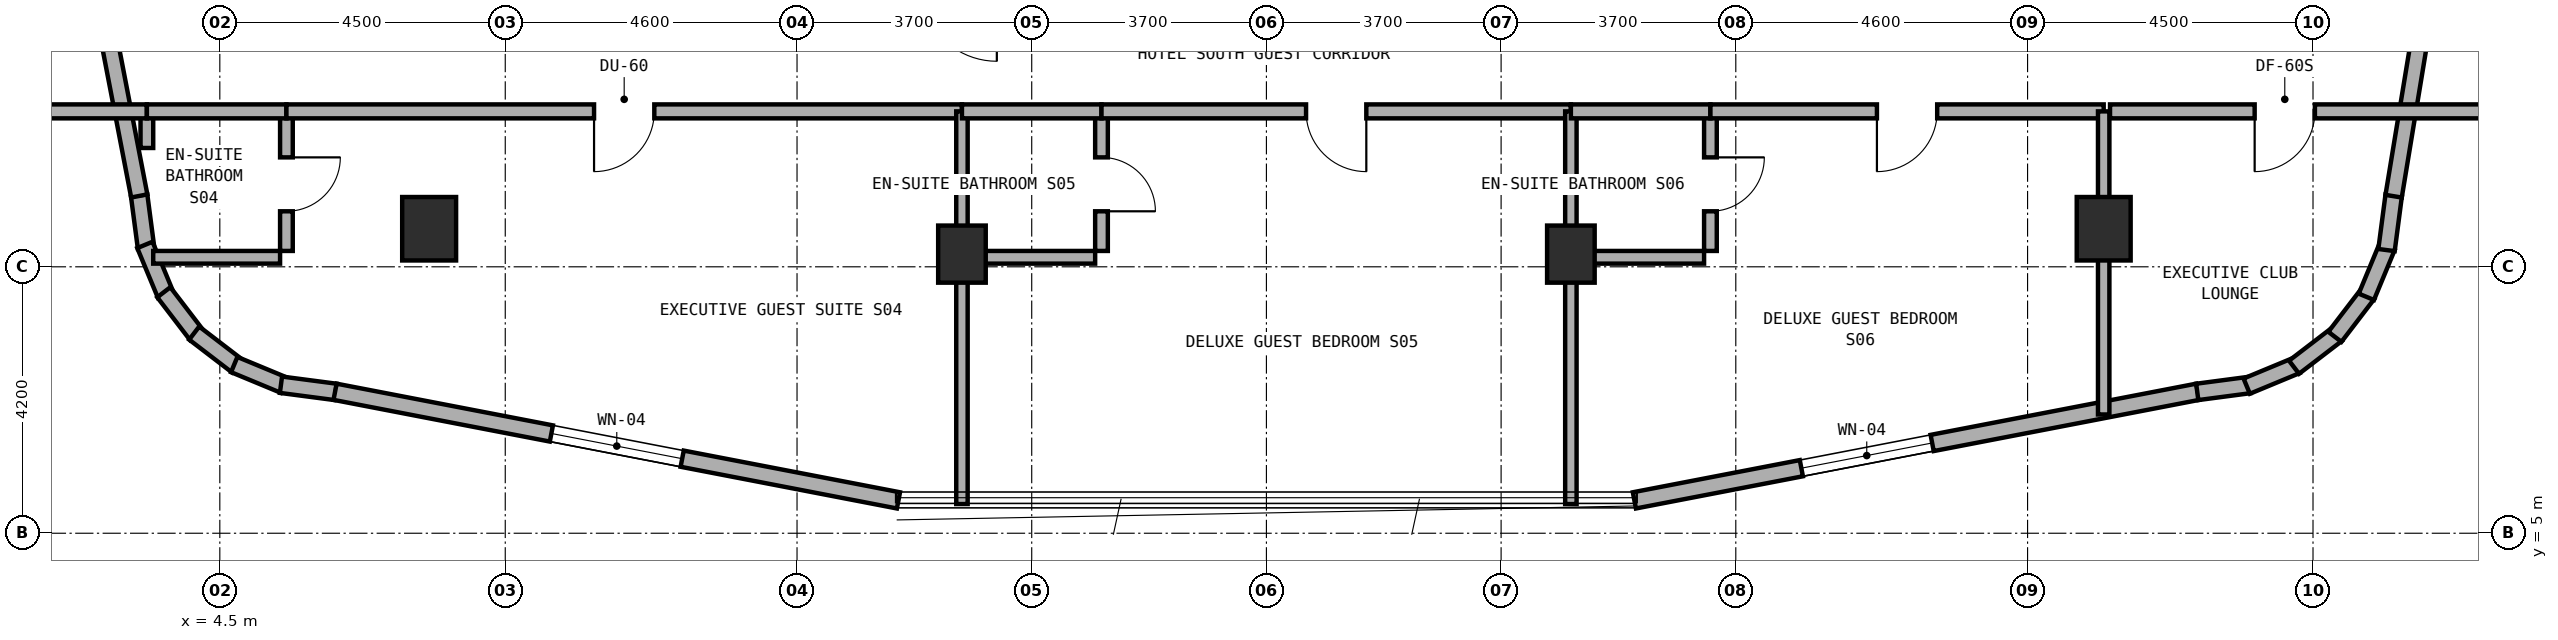
"""IFC4 building model, lengths in metres.
Left out: names, types, materials, properties, quantities, classifications, styles, units other than length and angle.
Written with IfcOpenShell. Run it as: python <this file> out.ifc"""

import sys

from ifc_helpers import new_model, si_unit, direction, frame, frame_2d, origin, origin_2d, place, context, subcontext, project, spatial, rectangle, extrude, element, fill, save


model = new_model("IFC4")
c1 = context("Model", 3, precision=1e-05, world=origin(), true_north=direction((0.0, 1.0)))
c2 = subcontext(c1, "Body", "Model", "MODEL_VIEW")
j1 = project(units=[si_unit("LENGTHUNIT", "METRE"), si_unit("PLANEANGLEUNIT", "RADIAN")], contexts=[c1])
p1 = place(None, origin())
s1 = spatial("IfcSite", under=j1, at=p1, CompositionType="ELEMENT")
p2 = place(p1, origin())
s2 = spatial("IfcBuilding", under=s1, at=p2, CompositionType="ELEMENT")
p3 = place(p2, frame((0.0, 0.0, 181.1)))
s3 = spatial("IfcBuildingStorey", under=s2, at=p3, CompositionType="ELEMENT", Elevation=181.1)
for number, where, z_axis, x_axis in (
    (1, (16.2, 9.4, 0.0), (0.0, 0.0, 1.0), (1.0, 0.0, 0.0)),
    (2, (25.8, 9.4, 0.0), (0.0, 0.0, 1.0), (1.0, 0.0, 0.0)),
):
    element("IfcColumn", number, at=place(p3, frame(where, z_axis=z_axis, x_axis=x_axis)), inside=s3, PredefinedType="COLUMN", context=c2, shape_type="SweptSolid", body=[
        extrude(rectangle(XDim=0.75, YDim=0.9, at=origin_2d()), origin(), (0.0, 0.0, 1.0), 3.6),
    ])
for number, where, z_axis, x_axis in (
    (3, (7.8, 9.8, 0.0), (0.0, 0.0, 1.0), (1.0, 0.0, 0.0)),
    (4, (34.2, 9.8, 0.0), (0.0, 0.0, 1.0), (1.0, 0.0, 0.0)),
):
    element("IfcColumn", number, at=place(p3, frame(where, z_axis=z_axis, x_axis=x_axis)), inside=s3, PredefinedType="COLUMN", context=c2, shape_type="SweptSolid", body=[
        extrude(rectangle(XDim=0.85, YDim=1.0, at=origin_2d()), origin(), (0.0, 0.0, 1.0), 3.6),
    ])
p4 = place(p3, frame((3.228, 10.325, 0.0), z_axis=(0.0, 0.0, 1.0), x_axis=(0.130704676564, -0.99142134712, 0.0)))
e5 = element("IfcWall", 5, at=p4, inside=s3, PredefinedType="STANDARD", context=c2, shape_type="SweptSolid", body=[
    extrude(rectangle(XDim=0.833, YDim=0.26, at=frame_2d((0.417, 0.0))), origin(), (0.0, 0.0, 1.0), 3.32),
])
p5 = place(p3, frame((3.319, 9.545, 0.0), z_axis=(0.0, 0.0, 1.0), x_axis=(0.383086687796, -0.923712395518, 0.0)))
e6 = element("IfcWall", 6, at=p5, inside=s3, PredefinedType="STANDARD", context=c2, shape_type="SweptSolid", body=[
    extrude(rectangle(XDim=0.851, YDim=0.26, at=frame_2d((0.425, 0.0))), origin(), (0.0, 0.0, 1.0), 3.32),
])
for number, where, z_axis, x_axis in (
    (7, (3.617, 8.799, 0.0), (0.0, 0.0, 1.0), (0.608, -0.794, 0.0)),
    (8, (4.096, 8.155, 0.0), (0.0, 0.0, 1.0), (0.794, -0.608, 0.0)),
):
    element("IfcWall", number, at=place(p3, frame(where, z_axis=z_axis, x_axis=x_axis)), inside=s3, PredefinedType="STANDARD", context=c2, shape_type="SweptSolid", body=[
        extrude(rectangle(XDim=0.85, YDim=0.26, at=frame_2d((0.425, 0.0))), origin(), (0.0, 0.0, 1.0), 3.32),
    ])
p6 = place(p3, frame((4.727, 7.659, 0.0), z_axis=(0.0, 0.0, 1.0), x_axis=(0.923712395518, -0.383086687796, 0.0)))
e9 = element("IfcWall", 9, at=p6, inside=s3, PredefinedType="STANDARD", context=c2, shape_type="SweptSolid", body=[
    extrude(rectangle(XDim=0.851, YDim=0.26, at=frame_2d((0.425, 0.0))), origin(), (0.0, 0.0, 1.0), 3.32),
])
p7 = place(p3, frame((5.464, 7.341, 0.0), z_axis=(0.0, 0.0, 1.0), x_axis=(0.991488716273, -0.130192647656, 0.0)))
e10 = element("IfcWall", 10, at=p7, inside=s3, PredefinedType="STANDARD", context=c2, shape_type="SweptSolid", body=[
    extrude(rectangle(XDim=0.868, YDim=0.26, at=frame_2d((0.434, 0.0))), origin(), (0.0, 0.0, 1.0), 3.32),
])
p8 = place(p3, frame((6.317, 7.23, 0.0), z_axis=(0.0, 0.0, 1.0), x_axis=(0.98192801022, -0.189254809039, 0.0)))
e11 = element("IfcWall", 11, at=p8, inside=s3, PredefinedType="STANDARD", context=c2, shape_type="SweptSolid", body=[
    extrude(rectangle(XDim=9.046, YDim=0.26, at=frame_2d((4.523, 0.0))), origin(), (0.0, 0.0, 1.0), 3.32),
])
p9 = place(p8, frame((3.473, 0.0, 0.85)))
e12 = element("IfcOpeningElement", 12, at=p9, cuts=e11, PredefinedType="OPENING", context=c2, shape_type="SweptSolid", body=[
    extrude(rectangle(XDim=2.1, YDim=1.5, at=frame_2d((1.05, 0.75))), frame((0.0, 0.14, 0.0), z_axis=(0.0, -1.0, 0.0), x_axis=(1.0, 0.0, 0.0)), (0.0, 0.0, 1.0), 0.28),
])
p10 = place(p3, frame((26.801, 5.518, 0.0), z_axis=(0.0, 0.0, 1.0), x_axis=(0.98192801022, 0.189254809039, 0.0)))
e13 = element("IfcWall", 13, at=p10, inside=s3, PredefinedType="STANDARD", context=c2, shape_type="SweptSolid", body=[
    extrude(rectangle(XDim=9.046, YDim=0.26, at=frame_2d((4.523, 0.0))), origin(), (0.0, 0.0, 1.0), 3.32),
])
p11 = place(p10, frame((2.681, 0.0, 0.85)))
e14 = element("IfcOpeningElement", 14, at=p11, cuts=e13, PredefinedType="OPENING", context=c2, shape_type="SweptSolid", body=[
    extrude(rectangle(XDim=2.1, YDim=1.5, at=frame_2d((1.05, 0.75))), frame((0.0, 0.14, 0.0), z_axis=(0.0, -1.0, 0.0), x_axis=(1.0, 0.0, 0.0)), (0.0, 0.0, 1.0), 0.28),
])
p12 = place(p3, frame((35.675, 7.228, 0.0), z_axis=(0.0, 0.0, 1.0), x_axis=(0.99142134712, 0.130704676564, 0.0)))
e15 = element("IfcWall", 15, at=p12, inside=s3, PredefinedType="STANDARD", context=c2, shape_type="SweptSolid", body=[
    extrude(rectangle(XDim=0.833, YDim=0.26, at=frame_2d((0.417, 0.0))), origin(), (0.0, 0.0, 1.0), 3.32),
])
p13 = place(p3, frame((36.455, 7.319, 0.0), z_axis=(0.0, 0.0, 1.0), x_axis=(0.923712395518, 0.383086687796, 0.0)))
e16 = element("IfcWall", 16, at=p13, inside=s3, PredefinedType="STANDARD", context=c2, shape_type="SweptSolid", body=[
    extrude(rectangle(XDim=0.851, YDim=0.26, at=frame_2d((0.425, 0.0))), origin(), (0.0, 0.0, 1.0), 3.32),
])
for number, where, z_axis, x_axis in (
    (17, (37.201, 7.617, 0.0), (0.0, 0.0, 1.0), (0.794, 0.608, 0.0)),
    (18, (37.845, 8.096, 0.0), (0.0, 0.0, 1.0), (0.608, 0.794, 0.0)),
):
    element("IfcWall", number, at=place(p3, frame(where, z_axis=z_axis, x_axis=x_axis)), inside=s3, PredefinedType="STANDARD", context=c2, shape_type="SweptSolid", body=[
        extrude(rectangle(XDim=0.85, YDim=0.26, at=frame_2d((0.425, 0.0))), origin(), (0.0, 0.0, 1.0), 3.32),
    ])
p14 = place(p3, frame((38.341, 8.727, 0.0), z_axis=(0.0, 0.0, 1.0), x_axis=(0.383086687796, 0.923712395518, 0.0)))
e19 = element("IfcWall", 19, at=p14, inside=s3, PredefinedType="STANDARD", context=c2, shape_type="SweptSolid", body=[
    extrude(rectangle(XDim=0.851, YDim=0.26, at=frame_2d((0.425, 0.0))), origin(), (0.0, 0.0, 1.0), 3.32),
])
p15 = place(p3, frame((38.659, 9.464, 0.0), z_axis=(0.0, 0.0, 1.0), x_axis=(0.130192647656, 0.991488716273, 0.0)))
e20 = element("IfcWall", 20, at=p15, inside=s3, PredefinedType="STANDARD", context=c2, shape_type="SweptSolid", body=[
    extrude(rectangle(XDim=0.868, YDim=0.26, at=frame_2d((0.434, 0.0))), origin(), (0.0, 0.0, 1.0), 3.32),
])
p16 = place(p3, frame((38.771, 10.313, 0.0), z_axis=(0.0, 0.0, 1.0), x_axis=(0.16277908586, 0.986662540693, 0.0)))
e21 = element("IfcWall", 21, at=p16, inside=s3, PredefinedType="STANDARD", context=c2, shape_type="SweptSolid", body=[
    extrude(rectangle(XDim=10.437, YDim=0.26, at=frame_2d((5.219, 0.0))), origin(), (0.0, 0.0, 1.0), 3.32),
])
p17 = place(p16, frame((5.81, 0.0, 0.85)))
e22 = element("IfcOpeningElement", 22, at=p17, cuts=e21, PredefinedType="OPENING", context=c2, shape_type="SweptSolid", body=[
    extrude(rectangle(XDim=2.1, YDim=1.5, at=frame_2d((1.05, 0.75))), frame((0.0, 0.14, 0.0), z_axis=(0.0, -1.0, 0.0), x_axis=(1.0, 0.0, 0.0)), (0.0, 0.0, 1.0), 0.28),
])
p18 = place(p3, frame((1.518, 19.199, 0.0), z_axis=(0.0, 0.0, 1.0), x_axis=(0.189254809039, -0.98192801022, 0.0)))
e23 = element("IfcWall", 23, at=p18, inside=s3, PredefinedType="STANDARD", context=c2, shape_type="SweptSolid", body=[
    extrude(rectangle(XDim=9.046, YDim=0.26, at=frame_2d((4.523, 0.0))), origin(), (0.0, 0.0, 1.0), 3.32),
])
p19 = place(p18, frame((2.733, 0.0, 0.85)))
e24 = element("IfcOpeningElement", 24, at=p19, cuts=e23, PredefinedType="OPENING", context=c2, shape_type="SweptSolid", body=[
    extrude(rectangle(XDim=2.1, YDim=1.5, at=frame_2d((1.05, 0.75))), frame((0.0, 0.14, 0.0), z_axis=(0.0, -1.0, 0.0), x_axis=(1.0, 0.0, 0.0)), (0.0, 0.0, 1.0), 0.28),
])
p20 = place(p3, frame((5.55, 9.45, 0.0), z_axis=(0.0, 0.0, 1.0), x_axis=(0.0, 1.0, 0.0)))
e25 = element("IfcWall", 25, at=p20, inside=s3, PredefinedType="PLUMBINGWALL", context=c2, shape_type="SweptSolid", body=[
    extrude(rectangle(XDim=2.1, YDim=0.2, at=frame_2d((1.05, 0.0))), origin(), (0.0, 0.0, 1.0), 3.32),
])
p21 = place(p20, frame((0.625, 0.0, 0.0)))
e26 = element("IfcOpeningElement", 26, at=p21, cuts=e25, PredefinedType="OPENING", context=c2, shape_type="SweptSolid", body=[
    extrude(rectangle(XDim=0.85, YDim=2.1, at=frame_2d((0.425, 1.05))), frame((0.0, 0.11, 0.0), z_axis=(0.0, -1.0, 0.0), x_axis=(1.0, 0.0, 0.0)), (0.0, 0.0, 1.0), 0.22),
])
p22 = place(p3, frame((3.45, 9.35, 0.0), z_axis=(0.0, 0.0, 1.0), x_axis=(1.0, 0.0, 0.0)))
e27 = element("IfcWall", 27, at=p22, inside=s3, PredefinedType="PLUMBINGWALL", context=c2, shape_type="SweptSolid", body=[
    extrude(rectangle(XDim=2.0, YDim=0.2, at=frame_2d((1.0, 0.0))), origin(), (0.0, 0.0, 1.0), 3.32),
])
p23 = place(p3, frame((3.35, 11.073, 0.0), z_axis=(0.0, 0.0, 1.0), x_axis=(0.0, 1.0, 0.0)))
e28 = element("IfcWall", 28, at=p23, inside=s3, PredefinedType="PLUMBINGWALL", context=c2, shape_type="SweptSolid", body=[
    extrude(rectangle(XDim=0.577, YDim=0.2, at=frame_2d((0.289, 0.0))), origin(), (0.0, 0.0, 1.0), 3.32),
])
p24 = place(p3, frame((1.56, 11.65, 0.0), z_axis=(0.0, 0.0, 1.0), x_axis=(1.0, 0.0, 0.0)))
e29 = element("IfcWall", 29, at=p24, inside=s3, PredefinedType="SOLIDWALL", context=c2, shape_type="SweptSolid", body=[
    extrude(rectangle(XDim=1.79, YDim=0.22, at=frame_2d((0.895, 0.0))), origin(), (0.0, 0.0, 1.0), 3.32),
])
p25 = place(p3, frame((3.35, 11.65, 0.0), z_axis=(0.0, 0.0, 1.0), x_axis=(1.0, 0.0, 0.0)))
e30 = element("IfcWall", 30, at=p25, inside=s3, PredefinedType="SOLIDWALL", context=c2, shape_type="SweptSolid", body=[
    extrude(rectangle(XDim=2.2, YDim=0.22, at=frame_2d((1.1, 0.0))), origin(), (0.0, 0.0, 1.0), 3.32),
])
p26 = place(p3, frame((5.55, 11.65, 0.0), z_axis=(0.0, 0.0, 1.0), x_axis=(1.0, 0.0, 0.0)))
e31 = element("IfcWall", 31, at=p26, inside=s3, PredefinedType="SOLIDWALL", context=c2, shape_type="SweptSolid", body=[
    extrude(rectangle(XDim=10.65, YDim=0.22, at=frame_2d((5.325, 0.0))), origin(), (0.0, 0.0, 1.0), 2.995),
])
p27 = place(p26, frame((4.85, 0.0, 0.0)))
e32 = element("IfcOpeningElement", 32, at=p27, cuts=e31, PredefinedType="OPENING", context=c2, shape_type="SweptSolid", body=[
    extrude(rectangle(XDim=0.95, YDim=2.1, at=frame_2d((0.475, 1.05))), frame((0.0, 0.12, 0.0), z_axis=(0.0, -1.0, 0.0), x_axis=(1.0, 0.0, 0.0)), (0.0, 0.0, 1.0), 0.24),
])
p28 = place(p3, frame((16.2, 5.46, 0.0), z_axis=(0.0, 0.0, 1.0), x_axis=(0.0, 1.0, 0.0)))
e33 = element("IfcWall", 33, at=p28, inside=s3, PredefinedType="SOLIDWALL", context=c2, shape_type="SweptSolid", body=[
    extrude(rectangle(XDim=6.19, YDim=0.18, at=frame_2d((3.095, 0.0))), origin(), (0.0, 0.0, 1.0), 2.935),
])
p29 = place(p3, frame((18.4, 9.45, 0.0), z_axis=(0.0, 0.0, 1.0), x_axis=(0.0, 1.0, 0.0)))
e34 = element("IfcWall", 34, at=p29, inside=s3, PredefinedType="PLUMBINGWALL", context=c2, shape_type="SweptSolid", body=[
    extrude(rectangle(XDim=2.1, YDim=0.2, at=frame_2d((1.05, 0.0))), origin(), (0.0, 0.0, 1.0), 2.895),
])
p30 = place(p29, frame((0.625, 0.0, 0.0)))
e35 = element("IfcOpeningElement", 35, at=p30, cuts=e34, PredefinedType="OPENING", context=c2, shape_type="SweptSolid", body=[
    extrude(rectangle(XDim=0.85, YDim=2.1, at=frame_2d((0.425, 1.05))), frame((0.0, 0.11, 0.0), z_axis=(0.0, -1.0, 0.0), x_axis=(1.0, 0.0, 0.0)), (0.0, 0.0, 1.0), 0.22),
])
p31 = place(p3, frame((16.3, 9.35, 0.0), z_axis=(0.0, 0.0, 1.0), x_axis=(1.0, 0.0, 0.0)))
e36 = element("IfcWall", 36, at=p31, inside=s3, PredefinedType="PLUMBINGWALL", context=c2, shape_type="SweptSolid", body=[
    extrude(rectangle(XDim=2.0, YDim=0.2, at=frame_2d((1.0, 0.0))), origin(), (0.0, 0.0, 1.0), 2.935),
])
p32 = place(p3, frame((16.2, 11.65, 0.0), z_axis=(0.0, 0.0, 1.0), x_axis=(1.0, 0.0, 0.0)))
e37 = element("IfcWall", 37, at=p32, inside=s3, PredefinedType="SOLIDWALL", context=c2, shape_type="SweptSolid", body=[
    extrude(rectangle(XDim=2.2, YDim=0.22, at=frame_2d((1.1, 0.0))), origin(), (0.0, 0.0, 1.0), 2.995),
])
p33 = place(p3, frame((18.4, 11.65, 0.0), z_axis=(0.0, 0.0, 1.0), x_axis=(1.0, 0.0, 0.0)))
e38 = element("IfcWall", 38, at=p33, inside=s3, PredefinedType="SOLIDWALL", context=c2, shape_type="SweptSolid", body=[
    extrude(rectangle(XDim=7.4, YDim=0.22, at=frame_2d((3.7, 0.0))), origin(), (0.0, 0.0, 1.0), 2.995),
])
p34 = place(p33, frame((3.225, 0.0, 0.0)))
e39 = element("IfcOpeningElement", 39, at=p34, cuts=e38, PredefinedType="OPENING", context=c2, shape_type="SweptSolid", body=[
    extrude(rectangle(XDim=0.95, YDim=2.1, at=frame_2d((0.475, 1.05))), frame((0.0, 0.12, 0.0), z_axis=(0.0, -1.0, 0.0), x_axis=(1.0, 0.0, 0.0)), (0.0, 0.0, 1.0), 0.24),
])
p35 = place(p3, frame((25.8, 5.46, 0.0), z_axis=(0.0, 0.0, 1.0), x_axis=(0.0, 1.0, 0.0)))
e40 = element("IfcWall", 40, at=p35, inside=s3, PredefinedType="SOLIDWALL", context=c2, shape_type="SweptSolid", body=[
    extrude(rectangle(XDim=6.19, YDim=0.18, at=frame_2d((3.095, 0.0))), origin(), (0.0, 0.0, 1.0), 2.935),
])
p36 = place(p3, frame((28.0, 9.45, 0.0), z_axis=(0.0, 0.0, 1.0), x_axis=(0.0, 1.0, 0.0)))
e41 = element("IfcWall", 41, at=p36, inside=s3, PredefinedType="PLUMBINGWALL", context=c2, shape_type="SweptSolid", body=[
    extrude(rectangle(XDim=2.1, YDim=0.2, at=frame_2d((1.05, 0.0))), origin(), (0.0, 0.0, 1.0), 2.895),
])
p37 = place(p36, frame((0.625, 0.0, 0.0)))
e42 = element("IfcOpeningElement", 42, at=p37, cuts=e41, PredefinedType="OPENING", context=c2, shape_type="SweptSolid", body=[
    extrude(rectangle(XDim=0.85, YDim=2.1, at=frame_2d((0.425, 1.05))), frame((0.0, 0.11, 0.0), z_axis=(0.0, -1.0, 0.0), x_axis=(1.0, 0.0, 0.0)), (0.0, 0.0, 1.0), 0.22),
])
p38 = place(p3, frame((25.9, 9.35, 0.0), z_axis=(0.0, 0.0, 1.0), x_axis=(1.0, 0.0, 0.0)))
e43 = element("IfcWall", 43, at=p38, inside=s3, PredefinedType="PLUMBINGWALL", context=c2, shape_type="SweptSolid", body=[
    extrude(rectangle(XDim=2.0, YDim=0.2, at=frame_2d((1.0, 0.0))), origin(), (0.0, 0.0, 1.0), 2.935),
])
p39 = place(p3, frame((25.8, 11.65, 0.0), z_axis=(0.0, 0.0, 1.0), x_axis=(1.0, 0.0, 0.0)))
e44 = element("IfcWall", 44, at=p39, inside=s3, PredefinedType="SOLIDWALL", context=c2, shape_type="SweptSolid", body=[
    extrude(rectangle(XDim=2.2, YDim=0.22, at=frame_2d((1.1, 0.0))), origin(), (0.0, 0.0, 1.0), 2.995),
])
p40 = place(p3, frame((28.0, 11.65, 0.0), z_axis=(0.0, 0.0, 1.0), x_axis=(1.0, 0.0, 0.0)))
e45 = element("IfcWall", 45, at=p40, inside=s3, PredefinedType="SOLIDWALL", context=c2, shape_type="SweptSolid", body=[
    extrude(rectangle(XDim=6.2, YDim=0.22, at=frame_2d((3.1, 0.0))), origin(), (0.0, 0.0, 1.0), 2.995),
])
p41 = place(p40, frame((2.625, 0.0, 0.0)))
e46 = element("IfcOpeningElement", 46, at=p41, cuts=e45, PredefinedType="OPENING", context=c2, shape_type="SweptSolid", body=[
    extrude(rectangle(XDim=0.95, YDim=2.1, at=frame_2d((0.475, 1.05))), frame((0.0, 0.12, 0.0), z_axis=(0.0, -1.0, 0.0), x_axis=(1.0, 0.0, 0.0)), (0.0, 0.0, 1.0), 0.24),
])
p42 = place(p3, frame((34.2, 6.872, 0.0), z_axis=(0.0, 0.0, 1.0), x_axis=(0.0, 1.0, 0.0)))
e47 = element("IfcWall", 47, at=p42, inside=s3, PredefinedType="SOLIDWALL", context=c2, shape_type="SweptSolid", body=[
    extrude(rectangle(XDim=4.778, YDim=0.18, at=frame_2d((2.389, 0.0))), origin(), (0.0, 0.0, 1.0), 2.935),
])
p43 = place(p3, frame((34.3, 11.65, 0.0), z_axis=(0.0, 0.0, 1.0), x_axis=(1.0, 0.0, 0.0)))
e48 = element("IfcWall", 48, at=p43, inside=s3, PredefinedType="SOLIDWALL", context=c2, shape_type="SweptSolid", body=[
    extrude(rectangle(XDim=6.04, YDim=0.22, at=frame_2d((3.02, 0.0))), origin(), (0.0, 0.0, 1.0), 2.935),
])
p44 = place(p43, frame((2.28, 0.0, 0.0)))
e49 = element("IfcOpeningElement", 49, at=p44, cuts=e48, PredefinedType="OPENING", context=c2, shape_type="SweptSolid", body=[
    extrude(rectangle(XDim=0.95, YDim=2.1, at=frame_2d((0.475, 1.05))), frame((0.0, 0.12, 0.0), z_axis=(0.0, -1.0, 0.0), x_axis=(1.0, 0.0, 0.0)), (0.0, 0.0, 1.0), 0.24),
])
p45 = place(p9, origin())
e50 = element("IfcWindow", 50, at=p45, inside=s3, PartitioningType="SINGLE_PANEL", PredefinedType="WINDOW", context=c2, shape_type="SweptSolid", body=[
    extrude(rectangle(XDim=2.1, YDim=1.5, at=frame_2d((1.05, 0.75))), frame((0.0, 0.03, 0.0), z_axis=(0.0, -1.0, 0.0), x_axis=(1.0, 0.0, 0.0)), (0.0, 0.0, 1.0), 0.06),
])
fill(e12, e50)
p46 = place(p11, origin())
e51 = element("IfcWindow", 51, at=p46, inside=s3, PartitioningType="SINGLE_PANEL", PredefinedType="WINDOW", context=c2, shape_type="SweptSolid", body=[
    extrude(rectangle(XDim=2.1, YDim=1.5, at=frame_2d((1.05, 0.75))), frame((0.0, 0.03, 0.0), z_axis=(0.0, -1.0, 0.0), x_axis=(1.0, 0.0, 0.0)), (0.0, 0.0, 1.0), 0.06),
])
fill(e14, e51)
p47 = place(p21, frame((0.85, 0.0, 0.0), z_axis=(0.0, 0.0, 1.0), x_axis=(-1.0, 0.0, 0.0)))
e52 = element("IfcDoor", 52, at=p47, inside=s3, OperationType="SINGLE_SWING_LEFT", PredefinedType="DOOR", context=c2, shape_type="SweptSolid", body=[
    extrude(rectangle(XDim=0.85, YDim=2.1, at=frame_2d((0.425, 1.05))), frame((0.0, 0.025, 0.0), z_axis=(0.0, -1.0, 0.0), x_axis=(1.0, 0.0, 0.0)), (0.0, 0.0, 1.0), 0.05),
])
fill(e26, e52)
p48 = place(p27, frame((0.95, 0.0, 0.0), z_axis=(0.0, 0.0, 1.0), x_axis=(-1.0, 0.0, 0.0)))
e53 = element("IfcDoor", 53, at=p48, inside=s3, OperationType="SINGLE_SWING_RIGHT", PredefinedType="DOOR", context=c2, shape_type="SweptSolid", body=[
    extrude(rectangle(XDim=0.95, YDim=2.1, at=frame_2d((0.475, 1.05))), frame((0.0, 0.025, 0.0), z_axis=(0.0, -1.0, 0.0), x_axis=(1.0, 0.0, 0.0)), (0.0, 0.0, 1.0), 0.05),
])
fill(e32, e53)
p49 = place(p30, frame((0.85, 0.0, 0.0), z_axis=(0.0, 0.0, 1.0), x_axis=(-1.0, 0.0, 0.0)))
e54 = element("IfcDoor", 54, at=p49, inside=s3, OperationType="SINGLE_SWING_RIGHT", PredefinedType="DOOR", context=c2, shape_type="SweptSolid", body=[
    extrude(rectangle(XDim=0.85, YDim=2.1, at=frame_2d((0.425, 1.05))), frame((0.0, 0.025, 0.0), z_axis=(0.0, -1.0, 0.0), x_axis=(1.0, 0.0, 0.0)), (0.0, 0.0, 1.0), 0.05),
])
fill(e35, e54)
p50 = place(p34, frame((0.95, 0.0, 0.0), z_axis=(0.0, 0.0, 1.0), x_axis=(-1.0, 0.0, 0.0)))
e55 = element("IfcDoor", 55, at=p50, inside=s3, OperationType="SINGLE_SWING_LEFT", PredefinedType="DOOR", context=c2, shape_type="SweptSolid", body=[
    extrude(rectangle(XDim=0.95, YDim=2.1, at=frame_2d((0.475, 1.05))), frame((0.0, 0.025, 0.0), z_axis=(0.0, -1.0, 0.0), x_axis=(1.0, 0.0, 0.0)), (0.0, 0.0, 1.0), 0.05),
])
fill(e39, e55)
p51 = place(p37, frame((0.85, 0.0, 0.0), z_axis=(0.0, 0.0, 1.0), x_axis=(-1.0, 0.0, 0.0)))
e56 = element("IfcDoor", 56, at=p51, inside=s3, OperationType="SINGLE_SWING_LEFT", PredefinedType="DOOR", context=c2, shape_type="SweptSolid", body=[
    extrude(rectangle(XDim=0.85, YDim=2.1, at=frame_2d((0.425, 1.05))), frame((0.0, 0.025, 0.0), z_axis=(0.0, -1.0, 0.0), x_axis=(1.0, 0.0, 0.0)), (0.0, 0.0, 1.0), 0.05),
])
fill(e42, e56)
p52 = place(p41, frame((0.95, 0.0, 0.0), z_axis=(0.0, 0.0, 1.0), x_axis=(-1.0, 0.0, 0.0)))
e57 = element("IfcDoor", 57, at=p52, inside=s3, OperationType="SINGLE_SWING_RIGHT", PredefinedType="DOOR", context=c2, shape_type="SweptSolid", body=[
    extrude(rectangle(XDim=0.95, YDim=2.1, at=frame_2d((0.475, 1.05))), frame((0.0, 0.025, 0.0), z_axis=(0.0, -1.0, 0.0), x_axis=(1.0, 0.0, 0.0)), (0.0, 0.0, 1.0), 0.05),
])
fill(e46, e57)
p53 = place(p44, frame((0.95, 0.0, 0.0), z_axis=(0.0, 0.0, 1.0), x_axis=(-1.0, 0.0, 0.0)))
e58 = element("IfcDoor", 58, at=p53, inside=s3, OperationType="SINGLE_SWING_RIGHT", PredefinedType="DOOR", context=c2, shape_type="SweptSolid", body=[
    extrude(rectangle(XDim=0.95, YDim=2.1, at=frame_2d((0.475, 1.05))), frame((0.0, 0.025, 0.0), z_axis=(0.0, -1.0, 0.0), x_axis=(1.0, 0.0, 0.0)), (0.0, 0.0, 1.0), 0.05),
])
fill(e49, e58)
save(model, sys.argv[1])
